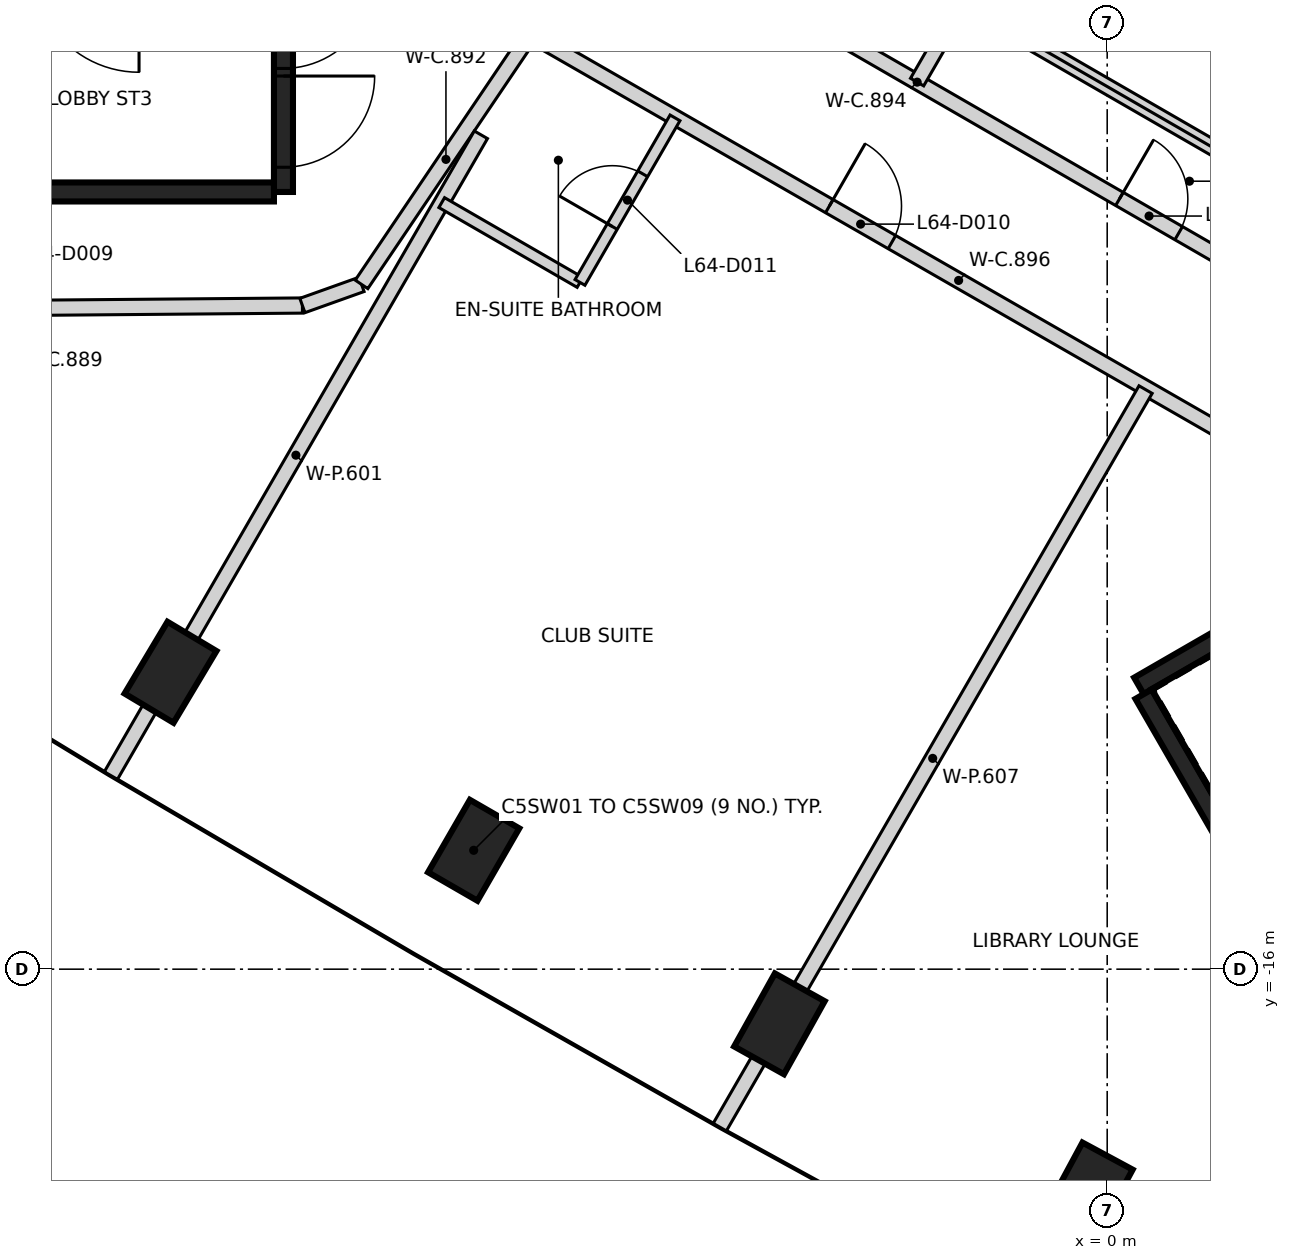
"""IFC4 building model, lengths in metres.
Left out: names, types, materials, properties, quantities, classifications, styles, units other than length and angle.
Written with IfcOpenShell. Run it as: python <this file> out.ifc"""

import sys

from ifc_helpers import new_model, si_unit, direction, frame, frame_2d, origin, origin_2d, place, context, subcontext, project, spatial, rectangle, extrude, element, fill, save


model = new_model("IFC4")
c1 = context("Model", 3, precision=1e-05, world=origin(), true_north=direction((0.0, 1.0)))
c2 = subcontext(c1, "Body", "Model", "MODEL_VIEW")
j1 = project(units=[si_unit("LENGTHUNIT", "METRE"), si_unit("PLANEANGLEUNIT", "RADIAN")], contexts=[c1])
p1 = place(None, origin())
s1 = spatial("IfcSite", under=j1, at=p1, CompositionType="ELEMENT")
p2 = place(p1, origin())
s2 = spatial("IfcBuilding", under=s1, at=p2, CompositionType="ELEMENT")
p3 = place(p2, frame((0.0, 0.0, 253.8)))
s3 = spatial("IfcBuildingStorey", under=s2, at=p3, CompositionType="ELEMENT", Elevation=253.8)
for number, where, z_axis, x_axis in (
    (1, (-12.323, -12.094, -0.35), (0.0, 0.0, 1.0), (0.513, 0.858, 0.0)),
    (2, (-8.335, -14.436, -0.35), (0.0, 0.0, 1.0), (0.5, 0.866, 0.0)),
    (3, (-4.312, -16.719, -0.35), (0.0, 0.0, 1.0), (0.487, 0.873, 0.0)),
    (4, (-0.256, -18.943, -0.35), (0.0, 0.0, 1.0), (0.475, 0.88, 0.0)),
):
    element("IfcColumn", number, at=place(p3, frame(where, z_axis=z_axis, x_axis=x_axis)), inside=s3, PredefinedType="COLUMN", context=c2, shape_type="SweptSolid", body=[
        extrude(rectangle(XDim=1.1, YDim=0.75, at=origin_2d()), origin(), (0.0, 0.0, 1.0), 2.64),
    ])
p4 = place(p3, frame((-10.837, 5.775, 0.0), z_axis=(0.0, 0.0, 1.0), x_axis=(0.0, -1.0, 0.0)))
e5 = element("IfcWall", 5, at=p4, inside=s3, PredefinedType="SHEAR", context=c2, shape_type="SweptSolid", body=[
    extrude(rectangle(XDim=11.55, YDim=0.25, at=frame_2d((5.775, 0.0))), origin(), (0.0, 0.0, 1.0), 3.2),
])
p5 = place(p4, frame((10.025, 0.0, 0.0)))
e6 = element("IfcOpeningElement", 6, at=p5, cuts=e5, PredefinedType="OPENING", context=c2, shape_type="SweptSolid", body=[
    extrude(rectangle(XDim=1.2, YDim=2.1, at=frame_2d((0.6, 1.05))), frame((0.0, 0.135, 0.0), z_axis=(0.0, -1.0, 0.0), x_axis=(1.0, 0.0, 0.0)), (0.0, 0.0, 1.0), 0.27),
])
p6 = place(p4, frame((8.725, 0.0, 0.0)))
e7 = element("IfcOpeningElement", 7, at=p6, cuts=e5, PredefinedType="OPENING", context=c2, shape_type="SweptSolid", body=[
    extrude(rectangle(XDim=1.2, YDim=2.1, at=frame_2d((0.6, 1.05))), frame((0.0, 0.135, 0.0), z_axis=(0.0, -1.0, 0.0), x_axis=(1.0, 0.0, 0.0)), (0.0, 0.0, 1.0), 0.27),
])
p7 = place(p3, frame((-10.963, -5.775, 0.0), z_axis=(0.0, 0.0, 1.0), x_axis=(-1.0, 0.0, 0.0)))
e8 = element("IfcWall", 8, at=p7, inside=s3, PredefinedType="SHEAR", context=c2, shape_type="SweptSolid", body=[
    extrude(rectangle(XDim=5.225, YDim=0.25, at=frame_2d((2.612, 0.0))), origin(), (0.0, 0.0, 1.0), 3.2),
])
p8 = place(p3, frame((0.417, -12.273, 0.0), z_axis=(0.0, 0.0, 1.0), x_axis=(0.866021906294, 0.500006057782, 0.0)))
e9 = element("IfcWall", 9, at=p8, inside=s3, PredefinedType="SHEAR", context=c2, shape_type="SweptSolid", body=[
    extrude(rectangle(XDim=11.55, YDim=0.25, at=frame_2d((5.775, 0.0))), origin(), (0.0, 0.0, 1.0), 3.2),
])
p9 = place(p8, frame((10.025, 0.0, 0.0)))
e10 = element("IfcOpeningElement", 10, at=p9, cuts=e9, PredefinedType="OPENING", context=c2, shape_type="SweptSolid", body=[
    extrude(rectangle(XDim=1.2, YDim=2.1, at=frame_2d((0.6, 1.05))), frame((0.0, 0.135, 0.0), z_axis=(0.0, -1.0, 0.0), x_axis=(1.0, 0.0, 0.0)), (0.0, 0.0, 1.0), 0.27),
])
p10 = place(p8, frame((8.725, 0.0, 0.0)))
e11 = element("IfcOpeningElement", 11, at=p10, cuts=e9, PredefinedType="OPENING", context=c2, shape_type="SweptSolid", body=[
    extrude(rectangle(XDim=1.2, YDim=2.1, at=frame_2d((0.6, 1.05))), frame((0.0, 0.135, 0.0), z_axis=(0.0, -1.0, 0.0), x_axis=(1.0, 0.0, 0.0)), (0.0, 0.0, 1.0), 0.27),
])
p11 = place(p3, frame((3.235, -17.153, 0.0), z_axis=(0.0, 0.0, 1.0), x_axis=(-0.500008851346, 0.866020293397, 0.0)))
e12 = element("IfcWall", 12, at=p11, inside=s3, PredefinedType="SHEAR", context=c2, shape_type="SweptSolid", body=[
    extrude(rectangle(XDim=5.51, YDim=0.25, at=frame_2d((2.755, 0.0))), origin(), (0.0, 0.0, 1.0), 3.2),
])
p12 = place(p3, frame((-19.15, -7.341, 0.0), z_axis=(0.0, 0.0, 1.0), x_axis=(0.999964623126, 0.008411450351, 0.0)))
e13 = element("IfcWall", 13, at=p12, inside=s3, PredefinedType="PARTITIONING", context=c2, shape_type="SweptSolid", body=[
    extrude(rectangle(XDim=8.562, YDim=0.2, at=frame_2d((4.281, 0.0))), origin(), (0.0, 0.0, 1.0), 3.2),
])
p13 = place(p12, frame((3.781, 0.0, 0.0)))
e14 = element("IfcOpeningElement", 14, at=p13, cuts=e13, PredefinedType="OPENING", context=c2, shape_type="SweptSolid", body=[
    extrude(rectangle(XDim=1.0, YDim=2.1, at=frame_2d((0.5, 1.05))), frame((0.0, 0.11, 0.0), z_axis=(0.0, -1.0, 0.0), x_axis=(1.0, 0.0, 0.0)), (0.0, 0.0, 1.0), 0.22),
])
p14 = place(p3, frame((-10.588, -7.269, 0.0), z_axis=(0.0, 0.0, 1.0), x_axis=(0.941634876095, 0.336635945974, 0.0)))
e15 = element("IfcWall", 15, at=p14, inside=s3, PredefinedType="PARTITIONING", context=c2, shape_type="SweptSolid", body=[
    extrude(rectangle(XDim=0.826, YDim=0.2, at=frame_2d((0.413, 0.0))), origin(), (0.0, 0.0, 1.0), 3.2),
])
p15 = place(p3, frame((-9.81, -6.991, 0.0), z_axis=(0.0, 0.0, 1.0), x_axis=(0.559616535009, 0.828751671941, 0.0)))
e16 = element("IfcWall", 16, at=p15, inside=s3, PredefinedType="PARTITIONING", context=c2, shape_type="SweptSolid", body=[
    extrude(rectangle(XDim=3.969, YDim=0.2, at=frame_2d((1.984, 0.0))), origin(), (0.0, 0.0, 1.0), 3.2),
])
p16 = place(p3, frame((-8.612, -0.801, 0.0), z_axis=(0.0, 0.0, 1.0), x_axis=(0.865998070783, -0.50004733916, 0.0)))
e17 = element("IfcWall", 17, at=p16, inside=s3, PredefinedType="PARTITIONING", context=c2, shape_type="SweptSolid", body=[
    extrude(rectangle(XDim=14.115, YDim=0.2, at=frame_2d((7.058, 0.0))), origin(), (0.0, 0.0, 1.0), 3.2),
])
p17 = place(p16, frame((3.085, 0.0, 0.0)))
e18 = element("IfcOpeningElement", 18, at=p17, cuts=e17, PredefinedType="OPENING", context=c2, shape_type="SweptSolid", body=[
    extrude(rectangle(XDim=0.9, YDim=2.1, at=frame_2d((0.45, 1.05))), frame((0.0, 0.11, 0.0), z_axis=(0.0, -1.0, 0.0), x_axis=(1.0, 0.0, 0.0)), (0.0, 0.0, 1.0), 0.22),
])
p18 = place(p16, frame((10.131, 0.0, 0.0)))
e19 = element("IfcOpeningElement", 19, at=p18, cuts=e17, PredefinedType="OPENING", context=c2, shape_type="SweptSolid", body=[
    extrude(rectangle(XDim=0.9, YDim=2.1, at=frame_2d((0.45, 1.05))), frame((0.0, 0.11, 0.0), z_axis=(0.0, -1.0, 0.0), x_axis=(1.0, 0.0, 0.0)), (0.0, 0.0, 1.0), 0.22),
])
p19 = place(p3, frame((-7.589, -3.702, 0.0), z_axis=(0.0, 0.0, 1.0), x_axis=(0.867107959402, -0.498120253293, 0.0)))
e20 = element("IfcWall", 20, at=p19, inside=s3, PredefinedType="PARTITIONING", context=c2, shape_type="SweptSolid", body=[
    extrude(rectangle(XDim=12.996, YDim=0.2, at=frame_2d((6.498, 0.0))), origin(), (0.0, 0.0, 1.0), 3.2),
])
p20 = place(p19, frame((4.536, 0.0, 0.0)))
e21 = element("IfcOpeningElement", 21, at=p20, cuts=e20, PredefinedType="OPENING", context=c2, shape_type="SweptSolid", body=[
    extrude(rectangle(XDim=0.95, YDim=2.1, at=frame_2d((0.475, 1.05))), frame((0.0, 0.11, 0.0), z_axis=(0.0, -1.0, 0.0), x_axis=(1.0, 0.0, 0.0)), (0.0, 0.0, 1.0), 0.22),
])
p21 = place(p19, frame((10.691, 0.0, 0.0)))
e22 = element("IfcOpeningElement", 22, at=p21, cuts=e20, PredefinedType="OPENING", context=c2, shape_type="SweptSolid", body=[
    extrude(rectangle(XDim=1.0, YDim=2.1, at=frame_2d((0.5, 1.05))), frame((0.0, 0.11, 0.0), z_axis=(0.0, -1.0, 0.0), x_axis=(1.0, 0.0, 0.0)), (0.0, 0.0, 1.0), 0.22),
])
p22 = place(p3, frame((-13.107, -13.453, 0.0), z_axis=(0.0, 0.0, 1.0), x_axis=(0.500058218288, 0.865991788831, 0.0)))
e23 = element("IfcWall", 23, at=p22, inside=s3, PredefinedType="PARTITIONING", context=c2, shape_type="SweptSolid", body=[
    extrude(rectangle(XDim=9.735, YDim=0.2, at=frame_2d((4.867, 0.0))), origin(), (0.0, 0.0, 1.0), 3.2),
])
p23 = place(p3, frame((-6.0, -0.924, 0.0), z_axis=(0.0, 0.0, 1.0), x_axis=(0.866012967051, -0.500021540435, 0.0)))
e24 = element("IfcWall", 24, at=p23, inside=s3, PredefinedType="PARTITIONING", context=c2, shape_type="SweptSolid", body=[
    extrude(rectangle(XDim=9.468, YDim=0.2, at=frame_2d((4.734, 0.0))), origin(), (0.0, 0.0, 1.0), 3.2),
])
p24 = place(p3, frame((-5.097, -18.078, 0.0), z_axis=(0.0, 0.0, 1.0), x_axis=(0.49996389635, 0.866046247233, 0.0)))
e25 = element("IfcWall", 25, at=p24, inside=s3, PredefinedType="PARTITIONING", context=c2, shape_type="SweptSolid", body=[
    extrude(rectangle(XDim=11.204, YDim=0.2, at=frame_2d((5.602, 0.0))), origin(), (0.0, 0.0, 1.0), 3.2),
])
p25 = place(p3, frame((-2.501, -4.329, 0.0), z_axis=(0.0, 0.0, 1.0), x_axis=(0.500209787201, 0.865904249203, 0.0)))
e26 = element("IfcWall", 26, at=p25, inside=s3, PredefinedType="PARTITIONING", context=c2, shape_type="SweptSolid", body=[
    extrude(rectangle(XDim=1.2, YDim=0.2, at=frame_2d((0.6, 0.0))), origin(), (0.0, 0.0, 1.0), 3.2),
])
p26 = place(p3, frame((-8.755, -5.915, 0.0), z_axis=(0.0, 0.0, 1.0), x_axis=(0.866038466041, -0.499977374825, 0.0)))
e27 = element("IfcWall", 27, at=p26, inside=s3, PredefinedType="PARTITIONING", context=c2, shape_type="SweptSolid", body=[
    extrude(rectangle(XDim=2.1, YDim=0.15, at=frame_2d((1.05, 0.0))), origin(), (0.0, 0.0, 1.0), 3.2),
])
p27 = place(p3, frame((-6.936, -6.965, 0.0), z_axis=(0.0, 0.0, 1.0), x_axis=(0.500004234368, 0.866022959057, 0.0)))
e28 = element("IfcWall", 28, at=p27, inside=s3, PredefinedType="PARTITIONING", context=c2, shape_type="SweptSolid", body=[
    extrude(rectangle(XDim=2.5, YDim=0.15, at=frame_2d((1.25, 0.0))), origin(), (0.0, 0.0, 1.0), 3.2),
])
p28 = place(p27, frame((0.85, 0.0, 0.0)))
e29 = element("IfcOpeningElement", 29, at=p28, cuts=e28, PredefinedType="OPENING", context=c2, shape_type="SweptSolid", body=[
    extrude(rectangle(XDim=0.8, YDim=2.1, at=frame_2d((0.4, 1.05))), frame((0.0, 0.085, 0.0), z_axis=(0.0, -1.0, 0.0), x_axis=(1.0, 0.0, 0.0)), (0.0, 0.0, 1.0), 0.17),
])
p29 = place(p5, origin())
e30 = element("IfcDoor", 30, at=p29, inside=s3, OperationType="SINGLE_SWING_LEFT", PredefinedType="DOOR", context=c2, shape_type="SweptSolid", body=[
    extrude(rectangle(XDim=1.2, YDim=2.1, at=frame_2d((0.6, 1.05))), frame((0.0, 0.025, 0.0), z_axis=(0.0, -1.0, 0.0), x_axis=(1.0, 0.0, 0.0)), (0.0, 0.0, 1.0), 0.05),
])
fill(e6, e30)
p30 = place(p6, origin())
e31 = element("IfcDoor", 31, at=p30, inside=s3, OperationType="SINGLE_SWING_RIGHT", PredefinedType="DOOR", context=c2, shape_type="SweptSolid", body=[
    extrude(rectangle(XDim=1.2, YDim=2.1, at=frame_2d((0.6, 1.05))), frame((0.0, 0.025, 0.0), z_axis=(0.0, -1.0, 0.0), x_axis=(1.0, 0.0, 0.0)), (0.0, 0.0, 1.0), 0.05),
])
fill(e7, e31)
p31 = place(p20, frame((0.95, 0.0, 0.0), z_axis=(0.0, 0.0, 1.0), x_axis=(-1.0, 0.0, 0.0)))
e32 = element("IfcDoor", 32, at=p31, inside=s3, OperationType="SINGLE_SWING_LEFT", PredefinedType="DOOR", context=c2, shape_type="SweptSolid", body=[
    extrude(rectangle(XDim=0.95, YDim=2.1, at=frame_2d((0.475, 1.05))), frame((0.0, 0.025, 0.0), z_axis=(0.0, -1.0, 0.0), x_axis=(1.0, 0.0, 0.0)), (0.0, 0.0, 1.0), 0.05),
])
fill(e21, e32)
p32 = place(p28, frame((0.8, 0.0, 0.0), z_axis=(0.0, 0.0, 1.0), x_axis=(-1.0, 0.0, 0.0)))
e33 = element("IfcDoor", 33, at=p32, inside=s3, OperationType="SINGLE_SWING_LEFT", PredefinedType="DOOR", context=c2, shape_type="SweptSolid", body=[
    extrude(rectangle(XDim=0.8, YDim=2.1, at=frame_2d((0.4, 1.05))), frame((0.0, 0.025, 0.0), z_axis=(0.0, -1.0, 0.0), x_axis=(1.0, 0.0, 0.0)), (0.0, 0.0, 1.0), 0.05),
])
fill(e29, e33)
p33 = place(p18, origin())
e34 = element("IfcDoor", 34, at=p33, inside=s3, OperationType="SINGLE_SWING_LEFT", PredefinedType="DOOR", context=c2, shape_type="SweptSolid", body=[
    extrude(rectangle(XDim=0.9, YDim=2.1, at=frame_2d((0.45, 1.05))), frame((0.0, 0.025, 0.0), z_axis=(0.0, -1.0, 0.0), x_axis=(1.0, 0.0, 0.0)), (0.0, 0.0, 1.0), 0.05),
])
fill(e19, e34)
save(model, sys.argv[1])
